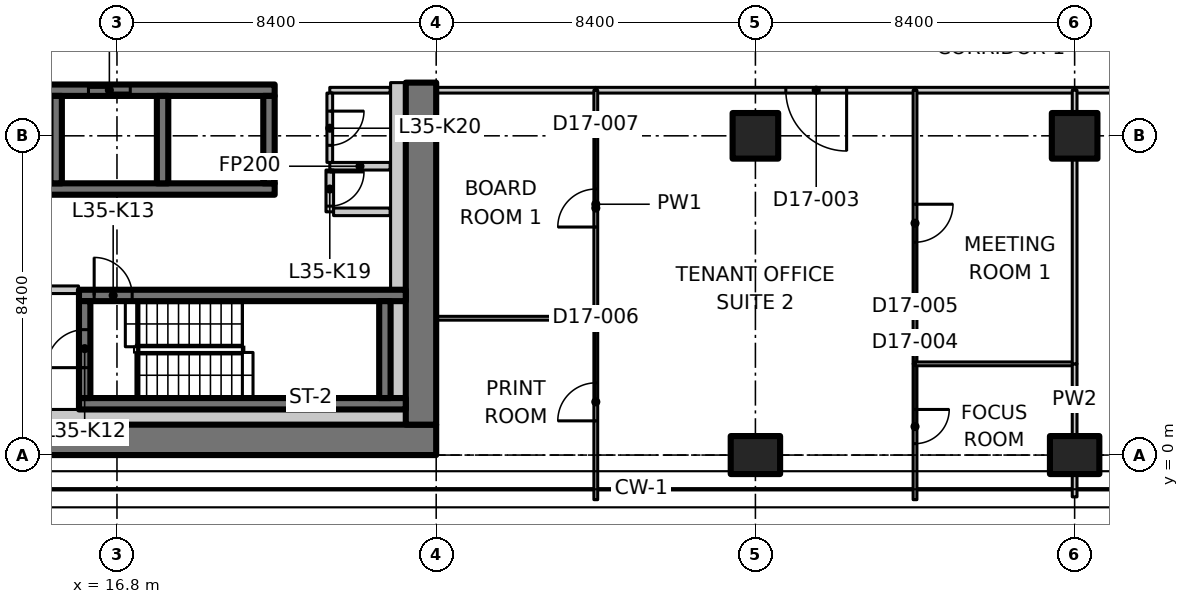
"""IFC4 building model, lengths in metres.
Left out: names, types, materials, properties, quantities, classifications, styles, units other than length and angle.
Written with IfcOpenShell. Run it as: python <this file> out.ifc"""

import sys

from ifc_helpers import new_model, si_unit, direction, frame, frame_2d, origin, origin_2d, place, context, subcontext, project, spatial, polyline, rectangle, outline, extrude, element, fill, save


model = new_model("IFC4")
c1 = context("Model", 3, precision=1e-05, world=origin(), true_north=direction((0.0, 1.0)))
c2 = subcontext(c1, "Body", "Model", "MODEL_VIEW")
j1 = project(units=[si_unit("LENGTHUNIT", "METRE"), si_unit("PLANEANGLEUNIT", "RADIAN")], contexts=[c1])
p1 = place(None, origin())
s1 = spatial("IfcSite", under=j1, at=p1, CompositionType="ELEMENT")
p2 = place(p1, origin())
s2 = spatial("IfcBuilding", under=s1, at=p2, CompositionType="ELEMENT")
p3 = place(p2, frame((0.0, 0.0, 142.1)))
s3 = spatial("IfcBuildingStorey", under=s2, at=p3, CompositionType="ELEMENT", Elevation=142.1)
p4 = place(p3, frame((33.6, 0.0, 0.0), z_axis=(0.0, 0.0, 1.0), x_axis=(0.0, 1.0, 0.0)))
e1 = element("IfcColumn", 1, at=p4, inside=s3, PredefinedType="COLUMN", context=c2, shape_type="SweptSolid", body=[
    extrude(rectangle(XDim=1.0, YDim=1.3, at=origin_2d()), origin(), (0.0, 0.0, 1.0), 3.35),
])
p5 = place(p3, frame((33.6, 8.4, 0.0), z_axis=(0.0, 0.0, 1.0), x_axis=(1.0, 0.0, 0.0)))
e2 = element("IfcColumn", 2, at=p5, inside=s3, PredefinedType="COLUMN", context=c2, shape_type="SweptSolid", body=[
    extrude(rectangle(XDim=1.2, YDim=1.2, at=origin_2d()), origin(), (0.0, 0.0, 1.0), 3.35),
])
p6 = place(p3, frame((42.0, 0.0, 0.0), z_axis=(0.0, 0.0, 1.0), x_axis=(0.0, 1.0, 0.0)))
e3 = element("IfcColumn", 3, at=p6, inside=s3, PredefinedType="COLUMN", context=c2, shape_type="SweptSolid", body=[
    extrude(rectangle(XDim=1.0, YDim=1.3, at=origin_2d()), origin(), (0.0, 0.0, 1.0), 3.35),
])
p7 = place(p3, frame((42.0, 8.4, 0.0), z_axis=(0.0, 0.0, 1.0), x_axis=(1.0, 0.0, 0.0)))
e4 = element("IfcColumn", 4, at=p7, inside=s3, PredefinedType="COLUMN", context=c2, shape_type="SweptSolid", body=[
    extrude(rectangle(XDim=1.2, YDim=1.2, at=origin_2d()), origin(), (0.0, 0.0, 1.0), 3.35),
])
p8 = place(p3, frame((7.136, 0.4, 0.0), z_axis=(0.0, 0.0, 1.0), x_axis=(1.0, 0.0, 0.0)))
e5 = element("IfcWall", 5, at=p8, inside=s3, PredefinedType="SHEAR", context=c2, shape_type="SweptSolid", body=[
    extrude(rectangle(XDim=18.063, YDim=0.8, at=frame_2d((9.032, 0.0))), origin(), (0.0, 0.0, 1.0), 3.35),
])
p9 = place(p3, frame((24.8, 0.8, 0.0), z_axis=(0.0, 0.0, 1.0), x_axis=(0.0, 1.0, 0.0)))
e6 = element("IfcWall", 6, at=p9, inside=s3, PredefinedType="SHEAR", context=c2, shape_type="SweptSolid", body=[
    extrude(rectangle(XDim=9.0, YDim=0.8, at=frame_2d((4.5, 0.0))), origin(), (0.0, 0.0, 1.0), 3.35),
])
p10 = place(p3, frame((0.8, 7.0, 0.0), z_axis=(0.0, 0.0, 1.0), x_axis=(1.0, 0.0, 0.0)))
e7 = element("IfcWall", 7, at=p10, inside=s3, PredefinedType="SHEAR", context=c2, shape_type="SweptSolid", body=[
    extrude(rectangle(XDim=20.15, YDim=0.3, at=frame_2d((10.075, 0.0))), origin(), (0.0, 0.0, 1.0), 3.35),
])
p11 = place(p3, frame((0.8, 9.6, 0.0), z_axis=(0.0, 0.0, 1.0), x_axis=(1.0, 0.0, 0.0)))
e8 = element("IfcWall", 8, at=p11, inside=s3, PredefinedType="SHEAR", context=c2, shape_type="SweptSolid", body=[
    extrude(rectangle(XDim=20.15, YDim=0.3, at=frame_2d((10.075, 0.0))), origin(), (0.0, 0.0, 1.0), 3.35),
])
p12 = place(p11, frame((1.25, 0.0, 0.0)))
e9 = element("IfcOpeningElement", 9, at=p12, cuts=e8, PredefinedType="OPENING", context=c2, shape_type="SweptSolid", body=[
    extrude(rectangle(XDim=1.1, YDim=2.3, at=frame_2d((0.55, 1.15))), frame((0.0, 0.16, 0.0), z_axis=(0.0, -1.0, 0.0), x_axis=(1.0, 0.0, 0.0)), (0.0, 0.0, 1.0), 0.32),
])
p13 = place(p11, frame((4.05, 0.0, 0.0)))
e10 = element("IfcOpeningElement", 10, at=p13, cuts=e8, PredefinedType="OPENING", context=c2, shape_type="SweptSolid", body=[
    extrude(rectangle(XDim=1.1, YDim=2.3, at=frame_2d((0.55, 1.15))), frame((0.0, 0.16, 0.0), z_axis=(0.0, -1.0, 0.0), x_axis=(1.0, 0.0, 0.0)), (0.0, 0.0, 1.0), 0.32),
])
p14 = place(p11, frame((6.85, 0.0, 0.0)))
e11 = element("IfcOpeningElement", 11, at=p14, cuts=e8, PredefinedType="OPENING", context=c2, shape_type="SweptSolid", body=[
    extrude(rectangle(XDim=1.1, YDim=2.3, at=frame_2d((0.55, 1.15))), frame((0.0, 0.16, 0.0), z_axis=(0.0, -1.0, 0.0), x_axis=(1.0, 0.0, 0.0)), (0.0, 0.0, 1.0), 0.32),
])
p15 = place(p11, frame((9.65, 0.0, 0.0)))
e12 = element("IfcOpeningElement", 12, at=p15, cuts=e8, PredefinedType="OPENING", context=c2, shape_type="SweptSolid", body=[
    extrude(rectangle(XDim=1.1, YDim=2.3, at=frame_2d((0.55, 1.15))), frame((0.0, 0.16, 0.0), z_axis=(0.0, -1.0, 0.0), x_axis=(1.0, 0.0, 0.0)), (0.0, 0.0, 1.0), 0.32),
])
p16 = place(p11, frame((12.45, 0.0, 0.0)))
e13 = element("IfcOpeningElement", 13, at=p16, cuts=e8, PredefinedType="OPENING", context=c2, shape_type="SweptSolid", body=[
    extrude(rectangle(XDim=1.1, YDim=2.3, at=frame_2d((0.55, 1.15))), frame((0.0, 0.16, 0.0), z_axis=(0.0, -1.0, 0.0), x_axis=(1.0, 0.0, 0.0)), (0.0, 0.0, 1.0), 0.32),
])
p17 = place(p11, frame((15.25, 0.0, 0.0)))
e14 = element("IfcOpeningElement", 14, at=p17, cuts=e8, PredefinedType="OPENING", context=c2, shape_type="SweptSolid", body=[
    extrude(rectangle(XDim=1.1, YDim=2.3, at=frame_2d((0.55, 1.15))), frame((0.0, 0.16, 0.0), z_axis=(0.0, -1.0, 0.0), x_axis=(1.0, 0.0, 0.0)), (0.0, 0.0, 1.0), 0.32),
])
for number, where, z_axis, x_axis in (
    (15, (15.2, 7.15, 0.0), (0.0, 0.0, 1.0), (0.0, 1.0, 0.0)),
    (16, (18.0, 7.15, 0.0), (0.0, 0.0, 1.0), (0.0, 1.0, 0.0)),
    (17, (20.8, 7.15, 0.0), (0.0, 0.0, 1.0), (0.0, 1.0, 0.0)),
):
    element("IfcWall", number, at=place(p3, frame(where, z_axis=z_axis, x_axis=x_axis)), inside=s3, PredefinedType="SHEAR", context=c2, shape_type="SweptSolid", body=[
        extrude(rectangle(XDim=2.3, YDim=0.3, at=frame_2d((1.15, 0.0))), origin(), (0.0, 0.0, 1.0), 3.35),
    ])
p18 = place(p3, frame((15.8, 1.35, 0.0), z_axis=(0.0, 0.0, 1.0), x_axis=(1.0, 0.0, 0.0)))
e18 = element("IfcWall", 18, at=p18, inside=s3, PredefinedType="SHEAR", context=c2, shape_type="SweptSolid", body=[
    extrude(rectangle(XDim=8.6, YDim=0.3, at=frame_2d((4.3, 0.0))), origin(), (0.0, 0.0, 1.0), 3.35),
])
p19 = place(p3, frame((15.8, 4.2, 0.0), z_axis=(0.0, 0.0, 1.0), x_axis=(1.0, 0.0, 0.0)))
e19 = element("IfcWall", 19, at=p19, inside=s3, PredefinedType="SHEAR", context=c2, shape_type="SweptSolid", body=[
    extrude(rectangle(XDim=8.6, YDim=0.3, at=frame_2d((4.3, 0.0))), origin(), (0.0, 0.0, 1.0), 3.35),
])
p20 = place(p19, frame((0.4, 0.0, 0.0)))
e20 = element("IfcOpeningElement", 20, at=p20, cuts=e19, PredefinedType="OPENING", context=c2, shape_type="SweptSolid", body=[
    extrude(rectangle(XDim=1.0, YDim=2.1, at=frame_2d((0.5, 1.05))), frame((0.0, 0.16, 0.0), z_axis=(0.0, -1.0, 0.0), x_axis=(1.0, 0.0, 0.0)), (0.0, 0.0, 1.0), 0.32),
])
p21 = place(p3, frame((15.95, 1.5, 0.0), z_axis=(0.0, 0.0, 1.0), x_axis=(0.0, 1.0, 0.0)))
e21 = element("IfcWall", 21, at=p21, inside=s3, PredefinedType="SHEAR", context=c2, shape_type="SweptSolid", body=[
    extrude(rectangle(XDim=2.55, YDim=0.3, at=frame_2d((1.275, 0.0))), origin(), (0.0, 0.0, 1.0), 3.35),
])
p22 = place(p21, frame((0.8, 0.0, 0.0)))
e22 = element("IfcOpeningElement", 22, at=p22, cuts=e21, PredefinedType="OPENING", context=c2, shape_type="SweptSolid", body=[
    extrude(rectangle(XDim=1.0, YDim=2.1, at=frame_2d((0.5, 1.05))), frame((0.0, 0.16, 0.0), z_axis=(0.0, -1.0, 0.0), x_axis=(1.0, 0.0, 0.0)), (0.0, 0.0, 1.0), 0.32),
])
p23 = place(p3, frame((23.85, 1.5, 0.0), z_axis=(0.0, 0.0, 1.0), x_axis=(0.0, 1.0, 0.0)))
e23 = element("IfcWall", 23, at=p23, inside=s3, PredefinedType="SHEAR", context=c2, shape_type="SweptSolid", body=[
    extrude(rectangle(XDim=2.55, YDim=0.3, at=frame_2d((1.275, 0.0))), origin(), (0.0, 0.0, 1.0), 3.35),
])
p24 = place(p3, frame((13.362, 4.35, 0.0), z_axis=(0.0, 0.0, 1.0), x_axis=(1.0, 0.0, 0.0)))
e24 = element("IfcWall", 24, at=p24, inside=s3, PredefinedType="PARTITIONING", context=c2, shape_type="SweptSolid", body=[
    extrude(rectangle(XDim=2.426, YDim=0.2, at=frame_2d((1.213, 0.0))), origin(), (0.0, 0.0, 1.0), 3.35),
])
p25 = place(p24, frame((0.638, 0.0, 0.0)))
e25 = element("IfcOpeningElement", 25, at=p25, cuts=e24, PredefinedType="OPENING", context=c2, shape_type="SweptSolid", body=[
    extrude(rectangle(XDim=1.0, YDim=2.1, at=frame_2d((0.5, 1.05))), frame((0.0, 0.11, 0.0), z_axis=(0.0, -1.0, 0.0), x_axis=(1.0, 0.0, 0.0)), (0.0, 0.0, 1.0), 0.22),
])
p26 = place(p3, frame((23.988, 7.6, 0.0), z_axis=(0.0, 0.0, 1.0), x_axis=(-1.0, 0.0, 0.0)))
e26 = element("IfcWall", 26, at=p26, inside=s3, PredefinedType="PARTITIONING", context=c2, shape_type="SweptSolid", body=[
    extrude(rectangle(XDim=1.588, YDim=0.2, at=frame_2d((0.794, 0.0))), origin(), (0.0, 0.0, 1.0), 3.35),
])
p27 = place(p3, frame((22.4, 7.5, 0.0), z_axis=(0.0, 0.0, 1.0), x_axis=(0.0, -1.0, 0.0)))
e27 = element("IfcWall", 27, at=p27, inside=s3, PredefinedType="PARTITIONING", context=c2, shape_type="SweptSolid", body=[
    extrude(rectangle(XDim=1.1, YDim=0.2, at=frame_2d((0.55, 0.0))), origin(), (0.0, 0.0, 1.0), 3.35),
])
p28 = place(p27, frame((0.05, 0.0, 0.0)))
e28 = element("IfcOpeningElement", 28, at=p28, cuts=e27, PredefinedType="OPENING", context=c2, shape_type="SweptSolid", body=[
    extrude(rectangle(XDim=0.9, YDim=2.1, at=frame_2d((0.45, 1.05))), frame((0.0, 0.11, 0.0), z_axis=(0.0, -1.0, 0.0), x_axis=(1.0, 0.0, 0.0)), (0.0, 0.0, 1.0), 0.22),
])
p29 = place(p3, frame((22.5, 6.4, 0.0), z_axis=(0.0, 0.0, 1.0), x_axis=(1.0, 0.0, 0.0)))
e29 = element("IfcWall", 29, at=p29, inside=s3, PredefinedType="PARTITIONING", context=c2, shape_type="SweptSolid", body=[
    extrude(rectangle(XDim=1.488, YDim=0.2, at=frame_2d((0.744, 0.0))), origin(), (0.0, 0.0, 1.0), 3.35),
])
p30 = place(p3, frame((23.988, 9.6, 0.0), z_axis=(0.0, 0.0, 1.0), x_axis=(-1.0, 0.0, 0.0)))
e30 = element("IfcWall", 30, at=p30, inside=s3, PredefinedType="PARTITIONING", context=c2, shape_type="SweptSolid", body=[
    extrude(rectangle(XDim=1.588, YDim=0.15, at=frame_2d((0.794, 0.0))), origin(), (0.0, 0.0, 1.0), 3.35),
])
p31 = place(p3, frame((22.4, 9.525, 0.0), z_axis=(0.0, 0.0, 1.0), x_axis=(0.0, -1.0, 0.0)))
e31 = element("IfcWall", 31, at=p31, inside=s3, PredefinedType="PARTITIONING", context=c2, shape_type="SweptSolid", body=[
    extrude(rectangle(XDim=1.825, YDim=0.15, at=frame_2d((0.913, 0.0))), origin(), (0.0, 0.0, 1.0), 3.35),
])
p32 = place(p31, frame((0.475, 0.0, 0.0)))
e32 = element("IfcOpeningElement", 32, at=p32, cuts=e31, PredefinedType="OPENING", context=c2, shape_type="SweptSolid", body=[
    extrude(rectangle(XDim=0.9, YDim=2.1, at=frame_2d((0.45, 1.05))), frame((0.0, 0.085, 0.0), z_axis=(0.0, -1.0, 0.0), x_axis=(1.0, 0.0, 0.0)), (0.0, 0.0, 1.0), 0.17),
])
p33 = place(p3, frame((13.35, 1.0, 0.0), z_axis=(0.0, 0.0, 1.0), x_axis=(1.0, 0.0, 0.0)))
e33 = element("IfcWall", 33, at=p33, inside=s3, PredefinedType="PARTITIONING", context=c2, shape_type="SweptSolid", body=[
    extrude(rectangle(XDim=11.05, YDim=0.4, at=frame_2d((5.525, 0.0))), origin(), (0.0, 0.0, 1.0), 3.35),
])
p34 = place(p3, frame((24.2, 1.5, 0.0), z_axis=(0.0, 0.0, 1.0), x_axis=(0.0, 1.0, 0.0)))
e34 = element("IfcWall", 34, at=p34, inside=s3, PredefinedType="PARTITIONING", context=c2, shape_type="SweptSolid", body=[
    extrude(rectangle(XDim=2.55, YDim=0.4, at=frame_2d((1.275, 0.0))), origin(), (0.0, 0.0, 1.0), 3.35),
])
p35 = place(p3, frame((24.2, 4.35, 0.0), z_axis=(0.0, 0.0, 1.0), x_axis=(0.0, 1.0, 0.0)))
e35 = element("IfcWall", 35, at=p35, inside=s3, PredefinedType="PARTITIONING", context=c2, shape_type="SweptSolid", body=[
    extrude(rectangle(XDim=5.45, YDim=0.4, at=frame_2d((2.725, 0.0))), origin(), (0.0, 0.0, 1.0), 3.35),
])
p36 = place(p3, frame((29.4, 9.6, 0.0), z_axis=(0.0, 0.0, 1.0), x_axis=(-1.0, 0.0, 0.0)))
e36 = element("IfcWall", 36, at=p36, inside=s3, PredefinedType="PARTITIONING", context=c2, shape_type="SweptSolid", body=[
    extrude(rectangle(XDim=4.2, YDim=0.15, at=frame_2d((2.1, 0.0))), origin(), (0.0, 0.0, 1.0), 3.33),
])
p37 = place(p3, frame((37.8, 9.6, 0.0), z_axis=(0.0, 0.0, 1.0), x_axis=(-1.0, 0.0, 0.0)))
e37 = element("IfcWall", 37, at=p37, inside=s3, PredefinedType="PARTITIONING", context=c2, shape_type="SweptSolid", body=[
    extrude(rectangle(XDim=8.4, YDim=0.15, at=frame_2d((4.2, 0.0))), origin(), (0.0, 0.0, 1.0), 3.33),
])
p38 = place(p37, frame((1.8, 0.0, 0.0)))
e38 = element("IfcOpeningElement", 38, at=p38, cuts=e37, PredefinedType="OPENING", context=c2, shape_type="SweptSolid", body=[
    extrude(rectangle(XDim=1.6, YDim=2.1, at=frame_2d((0.8, 1.05))), frame((0.0, 0.085, 0.0), z_axis=(0.0, -1.0, 0.0), x_axis=(1.0, 0.0, 0.0)), (0.0, 0.0, 1.0), 0.17),
])
p39 = place(p3, frame((42.0, 9.6, 0.0), z_axis=(0.0, 0.0, 1.0), x_axis=(-1.0, 0.0, 0.0)))
e39 = element("IfcWall", 39, at=p39, inside=s3, PredefinedType="PARTITIONING", context=c2, shape_type="SweptSolid", body=[
    extrude(rectangle(XDim=4.2, YDim=0.15, at=frame_2d((2.1, 0.0))), origin(), (0.0, 0.0, 1.0), 3.33),
])
p40 = place(p3, frame((50.4, 9.6, 0.0), z_axis=(0.0, 0.0, 1.0), x_axis=(-1.0, 0.0, 0.0)))
e40 = element("IfcWall", 40, at=p40, inside=s3, PredefinedType="PARTITIONING", context=c2, shape_type="SweptSolid", body=[
    extrude(rectangle(XDim=8.4, YDim=0.15, at=frame_2d((4.2, 0.0))), origin(), (0.0, 0.0, 1.0), 3.33),
])
p41 = place(p40, frame((3.3, 0.0, 0.0)))
e41 = element("IfcOpeningElement", 41, at=p41, cuts=e40, PredefinedType="OPENING", context=c2, shape_type="SweptSolid", body=[
    extrude(rectangle(XDim=1.6, YDim=2.1, at=frame_2d((0.8, 1.05))), frame((0.0, 0.085, 0.0), z_axis=(0.0, -1.0, 0.0), x_axis=(1.0, 0.0, 0.0)), (0.0, 0.0, 1.0), 0.17),
])
p42 = place(p3, frame((37.8, 2.4, 0.0), z_axis=(0.0, 0.0, 1.0), x_axis=(0.0, -1.0, 0.0)))
e42 = element("IfcWall", 42, at=p42, inside=s3, PredefinedType="PARTITIONING", context=c2, shape_type="SweptSolid", body=[
    extrude(rectangle(XDim=3.574, YDim=0.1, at=frame_2d((1.787, 0.0))), origin(), (0.0, 0.0, 1.0), 2.98),
])
p43 = place(p42, frame((1.2, 0.0, 0.0)))
e43 = element("IfcOpeningElement", 43, at=p43, cuts=e42, PredefinedType="OPENING", context=c2, shape_type="SweptSolid", body=[
    extrude(rectangle(XDim=0.9, YDim=2.1, at=frame_2d((0.45, 1.05))), frame((0.0, 0.06, 0.0), z_axis=(0.0, -1.0, 0.0), x_axis=(1.0, 0.0, 0.0)), (0.0, 0.0, 1.0), 0.12),
])
p44 = place(p3, frame((37.8, 9.6, 0.0), z_axis=(0.0, 0.0, 1.0), x_axis=(0.0, -1.0, 0.0)))
e44 = element("IfcWall", 44, at=p44, inside=s3, PredefinedType="PARTITIONING", context=c2, shape_type="SweptSolid", body=[
    extrude(rectangle(XDim=7.2, YDim=0.1, at=frame_2d((3.6, 0.0))), origin(), (0.0, 0.0, 1.0), 3.33),
])
p45 = place(p44, frame((3.0, 0.0, 0.0)))
e45 = element("IfcOpeningElement", 45, at=p45, cuts=e44, PredefinedType="OPENING", context=c2, shape_type="SweptSolid", body=[
    extrude(rectangle(XDim=1.0, YDim=2.1, at=frame_2d((0.5, 1.05))), frame((0.0, 0.06, 0.0), z_axis=(0.0, -1.0, 0.0), x_axis=(1.0, 0.0, 0.0)), (0.0, 0.0, 1.0), 0.12),
])
p46 = place(p3, frame((29.4, -1.174, 0.0), z_axis=(0.0, 0.0, 1.0), x_axis=(0.0, 1.0, 0.0)))
e46 = element("IfcWall", 46, at=p46, inside=s3, PredefinedType="PARTITIONING", context=c2, shape_type="SweptSolid", body=[
    extrude(outline(polyline([(0.0, 0.0), (4.774, 0.0), (4.774, 3.33), (1.624, 3.33), (1.622, 2.98), (0.726, 2.98), (0.724, 3.33), (0.074, 3.33), (0.0, 3.33), (0.0, 0.0)])), frame((0.0, 0.05, 0.0), z_axis=(0.0, -1.0, 0.0), x_axis=(1.0, 0.0, 0.0)), (0.0, 0.0, 1.0), 0.1),
])
p47 = place(p46, frame((2.074, 0.0, 0.0)))
e47 = element("IfcOpeningElement", 47, at=p47, cuts=e46, PredefinedType="OPENING", context=c2, shape_type="SweptSolid", body=[
    extrude(rectangle(XDim=1.0, YDim=2.1, at=frame_2d((0.5, 1.05))), frame((0.0, 0.06, 0.0), z_axis=(0.0, -1.0, 0.0), x_axis=(1.0, 0.0, 0.0)), (0.0, 0.0, 1.0), 0.12),
])
p48 = place(p3, frame((29.4, 3.6, 0.0), z_axis=(0.0, 0.0, 1.0), x_axis=(0.0, 1.0, 0.0)))
e48 = element("IfcWall", 48, at=p48, inside=s3, PredefinedType="PARTITIONING", context=c2, shape_type="SweptSolid", body=[
    extrude(rectangle(XDim=6.0, YDim=0.1, at=frame_2d((3.0, 0.0))), origin(), (0.0, 0.0, 1.0), 3.33),
])
p49 = place(p48, frame((2.4, 0.0, 0.0)))
e49 = element("IfcOpeningElement", 49, at=p49, cuts=e48, PredefinedType="OPENING", context=c2, shape_type="SweptSolid", body=[
    extrude(rectangle(XDim=1.0, YDim=2.1, at=frame_2d((0.5, 1.05))), frame((0.0, 0.06, 0.0), z_axis=(0.0, -1.0, 0.0), x_axis=(1.0, 0.0, 0.0)), (0.0, 0.0, 1.0), 0.12),
])
p50 = place(p3, frame((37.8, 2.4, 0.0), z_axis=(0.0, 0.0, 1.0), x_axis=(1.0, 0.0, 0.0)))
e50 = element("IfcWall", 50, at=p50, inside=s3, PredefinedType="PARTITIONING", context=c2, shape_type="SweptSolid", body=[
    extrude(rectangle(XDim=4.2, YDim=0.1, at=frame_2d((2.1, 0.0))), origin(), (0.0, 0.0, 1.0), 3.33),
])
p51 = place(p3, frame((42.0, 2.4, 0.0), z_axis=(0.0, 0.0, 1.0), x_axis=(0.0, -1.0, 0.0)))
e51 = element("IfcWall", 51, at=p51, inside=s3, PredefinedType="PARTITIONING", context=c2, shape_type="SweptSolid", body=[
    extrude(rectangle(XDim=1.88, YDim=0.125, at=frame_2d((0.94, 0.0))), origin(), (0.0, 0.0, 1.0), 3.33),
])
for number, where, z_axis, x_axis in (
    (52, (42.0, -0.52, 0.0), (0.0, 0.0, 1.0), (0.0, -1.0, 0.0)),
    (53, (42.0, 9.6, 0.0), (0.0, 0.0, 1.0), (0.0, -1.0, 0.0)),
):
    element("IfcWall", number, at=place(p3, frame(where, z_axis=z_axis, x_axis=x_axis)), inside=s3, PredefinedType="PARTITIONING", context=c2, shape_type="SweptSolid", body=[
        extrude(rectangle(XDim=0.58, YDim=0.125, at=frame_2d((0.29, 0.0))), origin(), (0.0, 0.0, 1.0), 3.33),
    ])
p52 = place(p3, frame((42.0, 7.78, 0.0), z_axis=(0.0, 0.0, 1.0), x_axis=(0.0, -1.0, 0.0)))
e54 = element("IfcWall", 54, at=p52, inside=s3, PredefinedType="PARTITIONING", context=c2, shape_type="SweptSolid", body=[
    extrude(rectangle(XDim=5.38, YDim=0.125, at=frame_2d((2.69, 0.0))), origin(), (0.0, 0.0, 1.0), 3.33),
])
p53 = place(p3, frame((25.2, 3.6, 0.0), z_axis=(0.0, 0.0, 1.0), x_axis=(1.0, 0.0, 0.0)))
e55 = element("IfcWall", 55, at=p53, inside=s3, PredefinedType="PARTITIONING", context=c2, shape_type="SweptSolid", body=[
    extrude(rectangle(XDim=4.2, YDim=0.1, at=frame_2d((2.1, 0.0))), origin(), (0.0, 0.0, 1.0), 3.33),
])
p54 = place(p17, origin())
e56 = element("IfcDoor", 56, at=p54, inside=s3, OperationType="SLIDING_TO_LEFT", PredefinedType="DOOR", context=c2, shape_type="SweptSolid", body=[
    extrude(rectangle(XDim=1.1, YDim=2.3, at=frame_2d((0.55, 1.15))), frame((0.0, 0.025, 0.0), z_axis=(0.0, -1.0, 0.0), x_axis=(1.0, 0.0, 0.0)), (0.0, 0.0, 1.0), 0.05),
])
fill(e14, e56)
p55 = place(p22, origin())
e57 = element("IfcDoor", 57, at=p55, inside=s3, OperationType="SINGLE_SWING_RIGHT", PredefinedType="DOOR", context=c2, shape_type="SweptSolid", body=[
    extrude(rectangle(XDim=1.0, YDim=2.1, at=frame_2d((0.5, 1.05))), frame((0.0, 0.025, 0.0), z_axis=(0.0, -1.0, 0.0), x_axis=(1.0, 0.0, 0.0)), (0.0, 0.0, 1.0), 0.05),
])
fill(e22, e57)
p56 = place(p20, origin())
e58 = element("IfcDoor", 58, at=p56, inside=s3, OperationType="SINGLE_SWING_LEFT", PredefinedType="DOOR", context=c2, shape_type="SweptSolid", body=[
    extrude(rectangle(XDim=1.0, YDim=2.1, at=frame_2d((0.5, 1.05))), frame((0.0, 0.025, 0.0), z_axis=(0.0, -1.0, 0.0), x_axis=(1.0, 0.0, 0.0)), (0.0, 0.0, 1.0), 0.05),
])
fill(e20, e58)
p57 = place(p28, origin())
e59 = element("IfcDoor", 59, at=p57, inside=s3, OperationType="SINGLE_SWING_LEFT", PredefinedType="DOOR", context=c2, shape_type="SweptSolid", body=[
    extrude(rectangle(XDim=0.9, YDim=2.1, at=frame_2d((0.45, 1.05))), frame((0.0, 0.025, 0.0), z_axis=(0.0, -1.0, 0.0), x_axis=(1.0, 0.0, 0.0)), (0.0, 0.0, 1.0), 0.05),
])
fill(e28, e59)
p58 = place(p32, origin())
e60 = element("IfcDoor", 60, at=p58, inside=s3, OperationType="SINGLE_SWING_RIGHT", PredefinedType="DOOR", context=c2, shape_type="SweptSolid", body=[
    extrude(rectangle(XDim=0.9, YDim=2.1, at=frame_2d((0.45, 1.05))), frame((0.0, 0.025, 0.0), z_axis=(0.0, -1.0, 0.0), x_axis=(1.0, 0.0, 0.0)), (0.0, 0.0, 1.0), 0.05),
])
fill(e32, e60)
p59 = place(p38, origin())
e61 = element("IfcDoor", 61, at=p59, inside=s3, OperationType="DOUBLE_DOOR_SINGLE_SWING", PredefinedType="DOOR", context=c2, shape_type="SweptSolid", body=[
    extrude(rectangle(XDim=1.6, YDim=2.1, at=frame_2d((0.8, 1.05))), frame((0.0, 0.025, 0.0), z_axis=(0.0, -1.0, 0.0), x_axis=(1.0, 0.0, 0.0)), (0.0, 0.0, 1.0), 0.05),
])
fill(e38, e61)
p60 = place(p43, origin())
e62 = element("IfcDoor", 62, at=p60, inside=s3, OperationType="SINGLE_SWING_LEFT", PredefinedType="DOOR", context=c2, shape_type="SweptSolid", body=[
    extrude(rectangle(XDim=0.9, YDim=2.1, at=frame_2d((0.45, 1.05))), frame((0.0, 0.025, 0.0), z_axis=(0.0, -1.0, 0.0), x_axis=(1.0, 0.0, 0.0)), (0.0, 0.0, 1.0), 0.05),
])
fill(e43, e62)
p61 = place(p45, origin())
e63 = element("IfcDoor", 63, at=p61, inside=s3, OperationType="SINGLE_SWING_LEFT", PredefinedType="DOOR", context=c2, shape_type="SweptSolid", body=[
    extrude(rectangle(XDim=1.0, YDim=2.1, at=frame_2d((0.5, 1.05))), frame((0.0, 0.025, 0.0), z_axis=(0.0, -1.0, 0.0), x_axis=(1.0, 0.0, 0.0)), (0.0, 0.0, 1.0), 0.05),
])
fill(e45, e63)
p62 = place(p47, origin())
e64 = element("IfcDoor", 64, at=p62, inside=s3, OperationType="SINGLE_SWING_LEFT", PredefinedType="DOOR", context=c2, shape_type="SweptSolid", body=[
    extrude(rectangle(XDim=1.0, YDim=2.1, at=frame_2d((0.5, 1.05))), frame((0.0, 0.025, 0.0), z_axis=(0.0, -1.0, 0.0), x_axis=(1.0, 0.0, 0.0)), (0.0, 0.0, 1.0), 0.05),
])
fill(e47, e64)
p63 = place(p49, origin())
e65 = element("IfcDoor", 65, at=p63, inside=s3, OperationType="SINGLE_SWING_LEFT", PredefinedType="DOOR", context=c2, shape_type="SweptSolid", body=[
    extrude(rectangle(XDim=1.0, YDim=2.1, at=frame_2d((0.5, 1.05))), frame((0.0, 0.025, 0.0), z_axis=(0.0, -1.0, 0.0), x_axis=(1.0, 0.0, 0.0)), (0.0, 0.0, 1.0), 0.05),
])
fill(e49, e65)
save(model, sys.argv[1])
